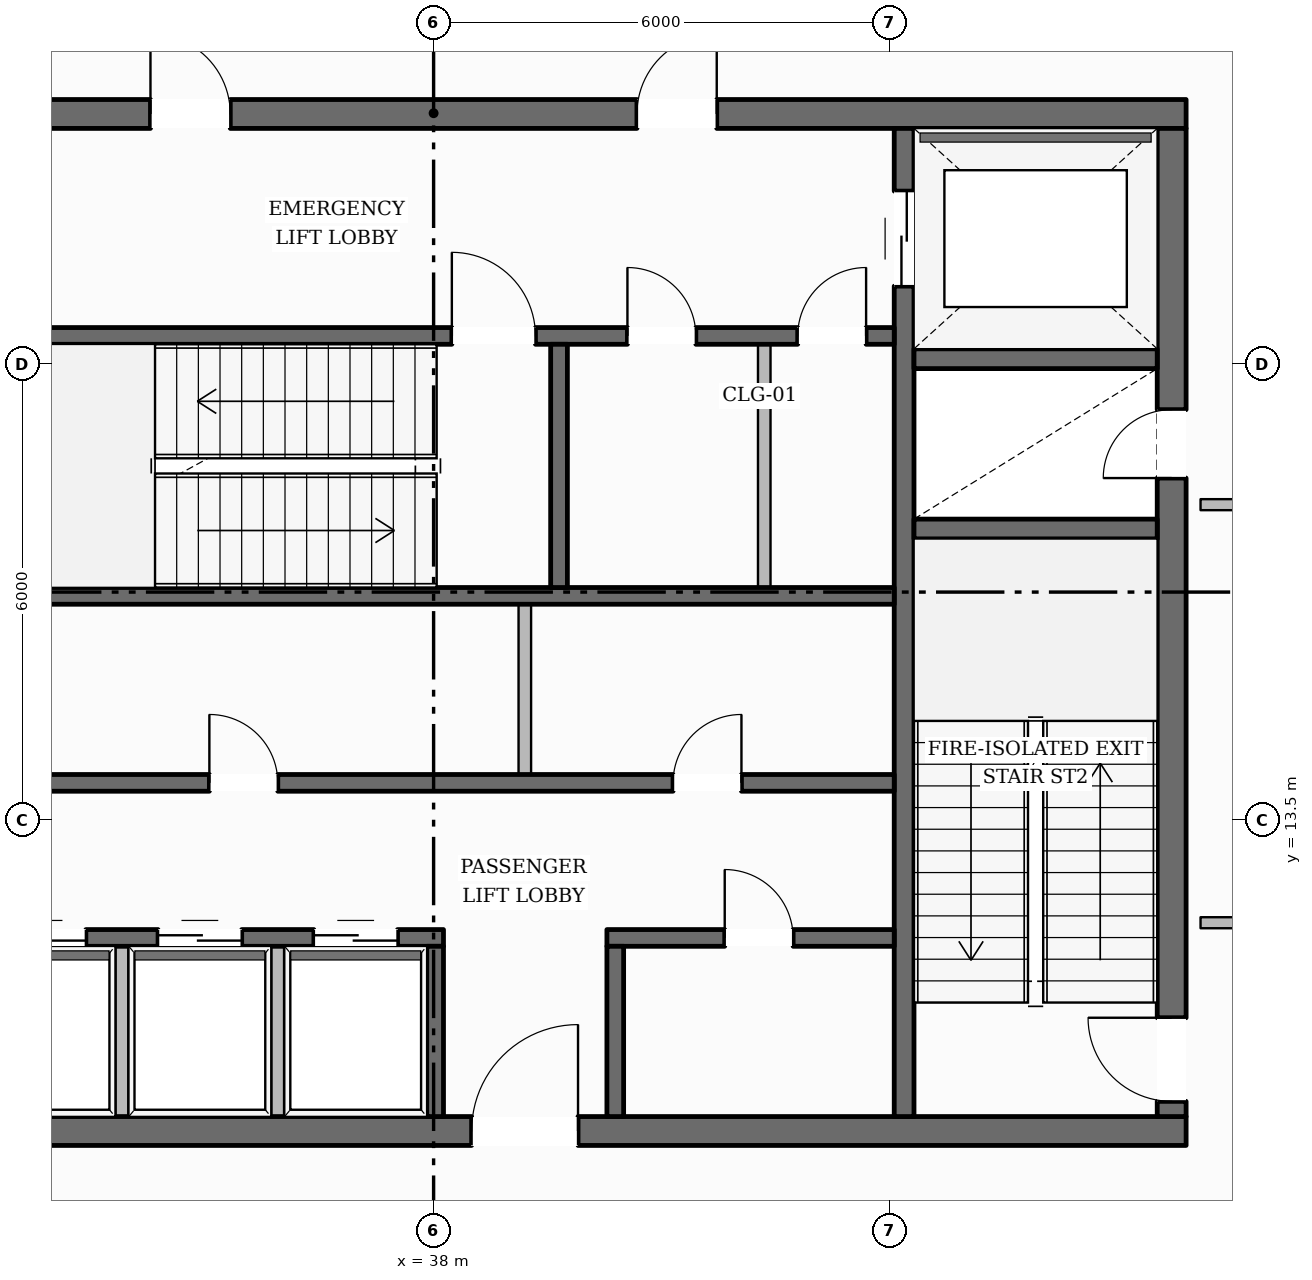
"""IFC4 building model, lengths in metres.
Left out: names, types, materials, properties, quantities, classifications, styles, units other than length and angle.
Written with IfcOpenShell. Run it as: python <this file> out.ifc"""

import sys

from ifc_helpers import new_model, si_unit, direction, frame, frame_2d, origin, place, context, subcontext, project, spatial, rectangle, extrude, element, fill, save


model = new_model("IFC4")
c1 = context("Model", 3, precision=1e-05, world=origin(), true_north=direction((0.0, 1.0)))
c2 = subcontext(c1, "Body", "Model", "MODEL_VIEW")
j1 = project(units=[si_unit("LENGTHUNIT", "METRE"), si_unit("PLANEANGLEUNIT", "RADIAN")], contexts=[c1])
p1 = place(None, origin())
s1 = spatial("IfcSite", under=j1, at=p1, CompositionType="ELEMENT")
p2 = place(p1, origin())
s2 = spatial("IfcBuilding", under=s1, at=p2, CompositionType="ELEMENT")
p3 = place(p2, frame((0.0, 0.0, 304.95)))
s3 = spatial("IfcBuildingStorey", under=s2, at=p3, CompositionType="ELEMENT", Elevation=304.95)
p4 = place(p3, frame((28.1, 9.41, 0.0), z_axis=(0.0, 0.0, 1.0), x_axis=(1.0, 0.0, 0.0)))
e1 = element("IfcWall", 1, at=p4, inside=s3, PredefinedType="SOLIDWALL", context=c2, shape_type="SweptSolid", body=[
    extrude(rectangle(XDim=19.8, YDim=0.38, at=frame_2d((9.9, 0.0))), origin(), (0.0, 0.0, 1.0), 4.77),
])
p5 = place(p4, frame((10.4, 0.0, 0.0)))
e2 = element("IfcOpeningElement", 2, at=p5, cuts=e1, PredefinedType="OPENING", context=c2, shape_type="SweptSolid", body=[
    extrude(rectangle(XDim=1.4, YDim=2.2, at=frame_2d((0.7, 1.1))), frame((0.0, 0.2, 0.0), z_axis=(0.0, -1.0, 0.0), x_axis=(1.0, 0.0, 0.0)), (0.0, 0.0, 1.0), 0.4),
])
p6 = place(p3, frame((28.1, 22.79, 0.0), z_axis=(0.0, 0.0, 1.0), x_axis=(1.0, 0.0, 0.0)))
e3 = element("IfcWall", 3, at=p6, inside=s3, PredefinedType="SOLIDWALL", context=c2, shape_type="SweptSolid", body=[
    extrude(rectangle(XDim=19.8, YDim=0.38, at=frame_2d((9.9, 0.0))), origin(), (0.0, 0.0, 1.0), 4.77),
])
p7 = place(p6, frame((6.175, 0.0, 0.0)))
e4 = element("IfcOpeningElement", 4, at=p7, cuts=e3, PredefinedType="OPENING", context=c2, shape_type="SweptSolid", body=[
    extrude(rectangle(XDim=1.05, YDim=2.15, at=frame_2d((0.525, 1.075))), frame((0.0, 0.2, 0.0), z_axis=(0.0, -1.0, 0.0), x_axis=(1.0, 0.0, 0.0)), (0.0, 0.0, 1.0), 0.4),
])
p8 = place(p6, frame((12.575, 0.0, 0.0)))
e5 = element("IfcOpeningElement", 5, at=p8, cuts=e3, PredefinedType="OPENING", context=c2, shape_type="SweptSolid", body=[
    extrude(rectangle(XDim=1.05, YDim=2.15, at=frame_2d((0.525, 1.075))), frame((0.0, 0.2, 0.0), z_axis=(0.0, -1.0, 0.0), x_axis=(1.0, 0.0, 0.0)), (0.0, 0.0, 1.0), 0.4),
])
p9 = place(p3, frame((47.71, 9.6, 0.0), z_axis=(0.0, 0.0, 1.0), x_axis=(0.0, 1.0, 0.0)))
e6 = element("IfcWall", 6, at=p9, inside=s3, PredefinedType="SOLIDWALL", context=c2, shape_type="SweptSolid", body=[
    extrude(rectangle(XDim=13.0, YDim=0.38, at=frame_2d((6.5, 0.0))), origin(), (0.0, 0.0, 1.0), 4.77),
])
p10 = place(p9, frame((0.2, 0.0, 0.0)))
e7 = element("IfcOpeningElement", 7, at=p10, cuts=e6, PredefinedType="OPENING", context=c2, shape_type="SweptSolid", body=[
    extrude(rectangle(XDim=1.1, YDim=2.15, at=frame_2d((0.55, 1.075))), frame((0.0, 0.2, 0.0), z_axis=(0.0, -1.0, 0.0), x_axis=(1.0, 0.0, 0.0)), (0.0, 0.0, 1.0), 0.4),
])
p11 = place(p9, frame((8.4, 0.0, 0.0)))
e8 = element("IfcOpeningElement", 8, at=p11, cuts=e6, PredefinedType="OPENING", context=c2, shape_type="SweptSolid", body=[
    extrude(rectangle(XDim=0.9, YDim=2.1, at=frame_2d((0.45, 1.05))), frame((0.0, 0.2, 0.0), z_axis=(0.0, -1.0, 0.0), x_axis=(1.0, 0.0, 0.0)), (0.0, 0.0, 1.0), 0.4),
])
p12 = place(p3, frame((44.19, 9.6, 0.0), z_axis=(0.0, 0.0, 1.0), x_axis=(0.0, 1.0, 0.0)))
e9 = element("IfcWall", 9, at=p12, inside=s3, PredefinedType="SHEAR", context=c2, shape_type="SweptSolid", body=[
    extrude(rectangle(XDim=13.0, YDim=0.26, at=frame_2d((6.5, 0.0))), origin(), (0.0, 0.0, 1.0), 4.77),
])
p13 = place(p12, frame((10.925, 0.0, 0.0)))
e10 = element("IfcOpeningElement", 10, at=p13, cuts=e9, PredefinedType="OPENING", context=c2, shape_type="SweptSolid", body=[
    extrude(rectangle(XDim=1.25, YDim=2.25, at=frame_2d((0.625, 1.125))), frame((0.0, 0.14, 0.0), z_axis=(0.0, -1.0, 0.0), x_axis=(1.0, 0.0, 0.0)), (0.0, 0.0, 1.0), 0.28),
])
for number, where, z_axis, x_axis in (
    (11, (44.32, 17.33, 0.0), (0.0, 0.0, 1.0), (1.0, 0.0, 0.0)),
    (12, (44.32, 19.57, 0.0), (0.0, 0.0, 1.0), (1.0, 0.0, 0.0)),
):
    element("IfcWall", number, at=place(p3, frame(where, z_axis=z_axis, x_axis=x_axis)), inside=s3, PredefinedType="SHEAR", context=c2, shape_type="SweptSolid", body=[
        extrude(rectangle(XDim=3.2, YDim=0.26, at=frame_2d((1.6, 0.0))), origin(), (0.0, 0.0, 1.0), 4.77),
    ])
p14 = place(p3, frame((31.94, 19.87, 0.0), z_axis=(0.0, 0.0, 1.0), x_axis=(1.0, 0.0, 0.0)))
e13 = element("IfcWall", 13, at=p14, inside=s3, PredefinedType="SOLIDWALL", context=c2, shape_type="SweptSolid", body=[
    extrude(rectangle(XDim=12.12, YDim=0.22, at=frame_2d((6.06, 0.0))), origin(), (0.0, 0.0, 1.0), 4.77),
])
p15 = place(p14, frame((6.3, 0.0, 0.0)))
e14 = element("IfcOpeningElement", 14, at=p15, cuts=e13, PredefinedType="OPENING", context=c2, shape_type="SweptSolid", body=[
    extrude(rectangle(XDim=1.1, YDim=2.15, at=frame_2d((0.55, 1.075))), frame((0.0, 0.12, 0.0), z_axis=(0.0, -1.0, 0.0), x_axis=(1.0, 0.0, 0.0)), (0.0, 0.0, 1.0), 0.24),
])
p16 = place(p14, frame((8.61, 0.0, 0.0)))
e15 = element("IfcOpeningElement", 15, at=p16, cuts=e13, PredefinedType="OPENING", context=c2, shape_type="SweptSolid", body=[
    extrude(rectangle(XDim=0.9, YDim=2.1, at=frame_2d((0.45, 1.05))), frame((0.0, 0.12, 0.0), z_axis=(0.0, -1.0, 0.0), x_axis=(1.0, 0.0, 0.0)), (0.0, 0.0, 1.0), 0.24),
])
p17 = place(p14, frame((10.85, 0.0, 0.0)))
e16 = element("IfcOpeningElement", 16, at=p17, cuts=e13, PredefinedType="OPENING", context=c2, shape_type="SweptSolid", body=[
    extrude(rectangle(XDim=0.9, YDim=2.1, at=frame_2d((0.45, 1.05))), frame((0.0, 0.12, 0.0), z_axis=(0.0, -1.0, 0.0), x_axis=(1.0, 0.0, 0.0)), (0.0, 0.0, 1.0), 0.24),
])
p18 = place(p3, frame((31.94, 16.45, 0.0), z_axis=(0.0, 0.0, 1.0), x_axis=(1.0, 0.0, 0.0)))
e17 = element("IfcWall", 17, at=p18, inside=s3, PredefinedType="SOLIDWALL", context=c2, shape_type="SweptSolid", body=[
    extrude(rectangle(XDim=12.12, YDim=0.22, at=frame_2d((6.06, 0.0))), origin(), (0.0, 0.0, 1.0), 4.77),
])
p19 = place(p3, frame((39.65, 16.56, 0.0), z_axis=(0.0, 0.0, 1.0), x_axis=(0.0, 1.0, 0.0)))
e18 = element("IfcWall", 18, at=p19, inside=s3, PredefinedType="SOLIDWALL", context=c2, shape_type="SweptSolid", body=[
    extrude(rectangle(XDim=3.2, YDim=0.22, at=frame_2d((1.6, 0.0))), origin(), (0.0, 0.0, 1.0), 4.77),
])
p20 = place(p3, frame((31.94, 13.99, 0.0), z_axis=(0.0, 0.0, 1.0), x_axis=(1.0, 0.0, 0.0)))
e19 = element("IfcWall", 19, at=p20, inside=s3, PredefinedType="SOLIDWALL", context=c2, shape_type="SweptSolid", body=[
    extrude(rectangle(XDim=12.12, YDim=0.22, at=frame_2d((6.06, 0.0))), origin(), (0.0, 0.0, 1.0), 4.77),
])
p21 = place(p20, frame((3.11, 0.0, 0.0)))
e20 = element("IfcOpeningElement", 20, at=p21, cuts=e19, PredefinedType="OPENING", context=c2, shape_type="SweptSolid", body=[
    extrude(rectangle(XDim=0.9, YDim=2.1, at=frame_2d((0.45, 1.05))), frame((0.0, 0.12, 0.0), z_axis=(0.0, -1.0, 0.0), x_axis=(1.0, 0.0, 0.0)), (0.0, 0.0, 1.0), 0.24),
])
p22 = place(p20, frame((9.21, 0.0, 0.0)))
e21 = element("IfcOpeningElement", 21, at=p22, cuts=e19, PredefinedType="OPENING", context=c2, shape_type="SweptSolid", body=[
    extrude(rectangle(XDim=0.9, YDim=2.1, at=frame_2d((0.45, 1.05))), frame((0.0, 0.12, 0.0), z_axis=(0.0, -1.0, 0.0), x_axis=(1.0, 0.0, 0.0)), (0.0, 0.0, 1.0), 0.24),
])
p23 = place(p3, frame((31.94, 11.95, 0.0), z_axis=(0.0, 0.0, 1.0), x_axis=(1.0, 0.0, 0.0)))
e22 = element("IfcWall", 22, at=p23, inside=s3, PredefinedType="SOLIDWALL", context=c2, shape_type="SweptSolid", body=[
    extrude(rectangle(XDim=6.19, YDim=0.22, at=frame_2d((3.095, 0.0))), origin(), (0.0, 0.0, 1.0), 4.77),
])
p24 = place(p23, frame((0.385, 0.0, 0.0)))
e23 = element("IfcOpeningElement", 23, at=p24, cuts=e22, PredefinedType="OPENING", context=c2, shape_type="SweptSolid", body=[
    extrude(rectangle(XDim=1.1, YDim=2.2, at=frame_2d((0.55, 1.1))), frame((0.0, 0.12, 0.0), z_axis=(0.0, -1.0, 0.0), x_axis=(1.0, 0.0, 0.0)), (0.0, 0.0, 1.0), 0.24),
])
p25 = place(p23, frame((2.435, 0.0, 0.0)))
e24 = element("IfcOpeningElement", 24, at=p25, cuts=e22, PredefinedType="OPENING", context=c2, shape_type="SweptSolid", body=[
    extrude(rectangle(XDim=1.1, YDim=2.2, at=frame_2d((0.55, 1.1))), frame((0.0, 0.12, 0.0), z_axis=(0.0, -1.0, 0.0), x_axis=(1.0, 0.0, 0.0)), (0.0, 0.0, 1.0), 0.24),
])
p26 = place(p23, frame((4.485, 0.0, 0.0)))
e25 = element("IfcOpeningElement", 25, at=p26, cuts=e22, PredefinedType="OPENING", context=c2, shape_type="SweptSolid", body=[
    extrude(rectangle(XDim=1.1, YDim=2.2, at=frame_2d((0.55, 1.1))), frame((0.0, 0.12, 0.0), z_axis=(0.0, -1.0, 0.0), x_axis=(1.0, 0.0, 0.0)), (0.0, 0.0, 1.0), 0.24),
])
p27 = place(p3, frame((40.28, 11.95, 0.0), z_axis=(0.0, 0.0, 1.0), x_axis=(1.0, 0.0, 0.0)))
e26 = element("IfcWall", 26, at=p27, inside=s3, PredefinedType="SOLIDWALL", context=c2, shape_type="SweptSolid", body=[
    extrude(rectangle(XDim=3.78, YDim=0.22, at=frame_2d((1.89, 0.0))), origin(), (0.0, 0.0, 1.0), 4.77),
])
p28 = place(p27, frame((1.55, 0.0, 0.0)))
e27 = element("IfcOpeningElement", 27, at=p28, cuts=e26, PredefinedType="OPENING", context=c2, shape_type="SweptSolid", body=[
    extrude(rectangle(XDim=0.9, YDim=2.1, at=frame_2d((0.45, 1.05))), frame((0.0, 0.12, 0.0), z_axis=(0.0, -1.0, 0.0), x_axis=(1.0, 0.0, 0.0)), (0.0, 0.0, 1.0), 0.24),
])
for number, where, z_axis, x_axis in (
    (28, (38.02, 9.6, 0.0), (0.0, 0.0, 1.0), (0.0, 1.0, 0.0)),
    (29, (40.39, 9.6, 0.0), (0.0, 0.0, 1.0), (0.0, 1.0, 0.0)),
):
    element("IfcWall", number, at=place(p3, frame(where, z_axis=z_axis, x_axis=x_axis)), inside=s3, PredefinedType="SOLIDWALL", context=c2, shape_type="SweptSolid", body=[
        extrude(rectangle(XDim=2.24, YDim=0.22, at=frame_2d((1.12, 0.0))), origin(), (0.0, 0.0, 1.0), 4.77),
    ])
p29 = place(p3, frame((15.972, 10.23, 0.0), z_axis=(0.0, 0.0, 1.0), x_axis=(0.490734788737, 0.871308996352, 0.0)))
e30 = element("IfcWall", 30, at=p29, inside=s3, PredefinedType="STANDARD", context=c2, shape_type="SweptSolid", body=[
    extrude(rectangle(XDim=39.892, YDim=0.35, at=frame_2d((19.946, 0.0))), origin(), (0.0, 0.0, 1.0), 4.012),
])
p30 = place(p29, frame((35.116, 0.0, 0.65)))
e31 = element("IfcOpeningElement", 31, at=p30, cuts=e30, PredefinedType="OPENING", context=c2, shape_type="SweptSolid", body=[
    extrude(rectangle(XDim=2.1, YDim=2.3, at=frame_2d((1.05, 1.15))), frame((0.0, 0.185, 0.0), z_axis=(0.0, -1.0, 0.0), x_axis=(1.0, 0.0, 0.0)), (0.0, 0.0, 1.0), 0.37),
])
p31 = place(p29, frame((2.666, 0.0, 0.65)))
e32 = element("IfcOpeningElement", 32, at=p31, cuts=e30, PredefinedType="OPENING", context=c2, shape_type="SweptSolid", body=[
    extrude(rectangle(XDim=2.1, YDim=2.3, at=frame_2d((1.05, 1.15))), frame((0.0, 0.185, 0.0), z_axis=(0.0, -1.0, 0.0), x_axis=(1.0, 0.0, 0.0)), (0.0, 0.0, 1.0), 0.37),
])
p32 = place(p3, frame((40.452, 44.989, 0.0), z_axis=(0.0, 0.0, 1.0), x_axis=(0.490734788737, -0.871308996352, 0.0)))
e33 = element("IfcWall", 33, at=p32, inside=s3, PredefinedType="STANDARD", context=c2, shape_type="SweptSolid", body=[
    extrude(rectangle(XDim=39.892, YDim=0.35, at=frame_2d((19.946, 0.0))), origin(), (0.0, 0.0, 1.0), 4.012),
])
p33 = place(p32, frame((35.126, 0.0, 0.65)))
e34 = element("IfcOpeningElement", 34, at=p33, cuts=e33, PredefinedType="OPENING", context=c2, shape_type="SweptSolid", body=[
    extrude(rectangle(XDim=2.1, YDim=2.3, at=frame_2d((1.05, 1.15))), frame((0.0, 0.185, 0.0), z_axis=(0.0, -1.0, 0.0), x_axis=(1.0, 0.0, 0.0)), (0.0, 0.0, 1.0), 0.37),
])
p34 = place(p32, frame((2.676, 0.0, 0.65)))
e35 = element("IfcOpeningElement", 35, at=p34, cuts=e33, PredefinedType="OPENING", context=c2, shape_type="SweptSolid", body=[
    extrude(rectangle(XDim=2.1, YDim=2.3, at=frame_2d((1.05, 1.15))), frame((0.0, 0.185, 0.0), z_axis=(0.0, -1.0, 0.0), x_axis=(1.0, 0.0, 0.0)), (0.0, 0.0, 1.0), 0.37),
])
for number, where, z_axis, x_axis in (
    (36, (33.9, 9.49, 0.0), (0.0, 0.0, 1.0), (0.0, 1.0, 0.0)),
    (37, (35.95, 9.49, 0.0), (0.0, 0.0, 1.0), (0.0, 1.0, 0.0)),
):
    element("IfcWall", number, at=place(p3, frame(where, z_axis=z_axis, x_axis=x_axis)), inside=s3, PredefinedType="PARTITIONING", context=c2, shape_type="SweptSolid", body=[
        extrude(rectangle(XDim=2.35, YDim=0.165, at=frame_2d((1.175, 0.0))), origin(), (0.0, 0.0, 1.0), 4.77),
    ])
p35 = place(p3, frame((39.2, 14.1, 0.0), z_axis=(0.0, 0.0, 1.0), x_axis=(0.0, 1.0, 0.0)))
e38 = element("IfcWall", 38, at=p35, inside=s3, PredefinedType="PARTITIONING", context=c2, shape_type="SweptSolid", body=[
    extrude(rectangle(XDim=2.24, YDim=0.165, at=frame_2d((1.12, 0.0))), origin(), (0.0, 0.0, 1.0), 4.77),
])
p36 = place(p3, frame((42.35, 16.56, 0.0), z_axis=(0.0, 0.0, 1.0), x_axis=(0.0, 1.0, 0.0)))
e39 = element("IfcWall", 39, at=p36, inside=s3, PredefinedType="PARTITIONING", context=c2, shape_type="SweptSolid", body=[
    extrude(rectangle(XDim=3.2, YDim=0.165, at=frame_2d((1.6, 0.0))), origin(), (0.0, 0.0, 1.0), 4.77),
])
for number, where, z_axis, x_axis in (
    (40, (49.91, 17.65, 0.0), (0.0, 0.0, 1.0), (-1.0, 0.0, 0.0)),
    (41, (48.09, 12.15, 0.0), (0.0, 0.0, 1.0), (1.0, 0.0, 0.0)),
):
    element("IfcWall", number, at=place(p3, frame(where, z_axis=z_axis, x_axis=x_axis)), inside=s3, PredefinedType="PARTITIONING", context=c2, shape_type="SweptSolid", body=[
        extrude(rectangle(XDim=1.82, YDim=0.145, at=frame_2d((0.91, 0.0))), origin(), (0.0, 0.0, 1.0), 4.77),
    ])
p37 = place(p10, origin())
e42 = element("IfcDoor", 42, at=p37, inside=s3, OperationType="SINGLE_SWING_RIGHT", PredefinedType="DOOR", context=c2, shape_type="SweptSolid", body=[
    extrude(rectangle(XDim=1.1, YDim=2.15, at=frame_2d((0.55, 1.075))), frame((0.0, 0.025, 0.0), z_axis=(0.0, -1.0, 0.0), x_axis=(1.0, 0.0, 0.0)), (0.0, 0.0, 1.0), 0.05),
])
fill(e7, e42)
p38 = place(p15, origin())
e43 = element("IfcDoor", 43, at=p38, inside=s3, OperationType="SINGLE_SWING_LEFT", PredefinedType="DOOR", context=c2, shape_type="SweptSolid", body=[
    extrude(rectangle(XDim=1.1, YDim=2.15, at=frame_2d((0.55, 1.075))), frame((0.0, 0.025, 0.0), z_axis=(0.0, -1.0, 0.0), x_axis=(1.0, 0.0, 0.0)), (0.0, 0.0, 1.0), 0.05),
])
fill(e14, e43)
p39 = place(p11, origin())
e44 = element("IfcDoor", 44, at=p39, inside=s3, OperationType="SINGLE_SWING_LEFT", PredefinedType="DOOR", context=c2, shape_type="SweptSolid", body=[
    extrude(rectangle(XDim=0.9, YDim=2.1, at=frame_2d((0.45, 1.05))), frame((0.0, 0.025, 0.0), z_axis=(0.0, -1.0, 0.0), x_axis=(1.0, 0.0, 0.0)), (0.0, 0.0, 1.0), 0.05),
])
fill(e8, e44)
p40 = place(p7, origin())
e45 = element("IfcDoor", 45, at=p40, inside=s3, OperationType="SINGLE_SWING_LEFT", PredefinedType="DOOR", context=c2, shape_type="SweptSolid", body=[
    extrude(rectangle(XDim=1.05, YDim=2.15, at=frame_2d((0.525, 1.075))), frame((0.0, 0.025, 0.0), z_axis=(0.0, -1.0, 0.0), x_axis=(1.0, 0.0, 0.0)), (0.0, 0.0, 1.0), 0.05),
])
fill(e4, e45)
p41 = place(p8, origin())
e46 = element("IfcDoor", 46, at=p41, inside=s3, OperationType="SINGLE_SWING_RIGHT", PredefinedType="DOOR", context=c2, shape_type="SweptSolid", body=[
    extrude(rectangle(XDim=1.05, YDim=2.15, at=frame_2d((0.525, 1.075))), frame((0.0, 0.025, 0.0), z_axis=(0.0, -1.0, 0.0), x_axis=(1.0, 0.0, 0.0)), (0.0, 0.0, 1.0), 0.05),
])
fill(e5, e46)
p42 = place(p13, origin())
e47 = element("IfcDoor", 47, at=p42, inside=s3, OperationType="DOUBLE_DOOR_SLIDING", PredefinedType="DOOR", context=c2, shape_type="SweptSolid", body=[
    extrude(rectangle(XDim=1.25, YDim=2.25, at=frame_2d((0.625, 1.125))), frame((0.0, 0.025, 0.0), z_axis=(0.0, -1.0, 0.0), x_axis=(1.0, 0.0, 0.0)), (0.0, 0.0, 1.0), 0.05),
])
fill(e10, e47)
p43 = place(p5, origin())
e48 = element("IfcDoor", 48, at=p43, inside=s3, OperationType="SINGLE_SWING_RIGHT", PredefinedType="DOOR", context=c2, shape_type="SweptSolid", body=[
    extrude(rectangle(XDim=1.4, YDim=2.2, at=frame_2d((0.7, 1.1))), frame((0.0, 0.025, 0.0), z_axis=(0.0, -1.0, 0.0), x_axis=(1.0, 0.0, 0.0)), (0.0, 0.0, 1.0), 0.05),
])
fill(e2, e48)
p44 = place(p24, origin())
e49 = element("IfcDoor", 49, at=p44, inside=s3, OperationType="DOUBLE_DOOR_SLIDING", PredefinedType="DOOR", context=c2, shape_type="SweptSolid", body=[
    extrude(rectangle(XDim=1.1, YDim=2.2, at=frame_2d((0.55, 1.1))), frame((0.0, 0.025, 0.0), z_axis=(0.0, -1.0, 0.0), x_axis=(1.0, 0.0, 0.0)), (0.0, 0.0, 1.0), 0.05),
])
fill(e23, e49)
p45 = place(p25, origin())
e50 = element("IfcDoor", 50, at=p45, inside=s3, OperationType="DOUBLE_DOOR_SLIDING", PredefinedType="DOOR", context=c2, shape_type="SweptSolid", body=[
    extrude(rectangle(XDim=1.1, YDim=2.2, at=frame_2d((0.55, 1.1))), frame((0.0, 0.025, 0.0), z_axis=(0.0, -1.0, 0.0), x_axis=(1.0, 0.0, 0.0)), (0.0, 0.0, 1.0), 0.05),
])
fill(e24, e50)
p46 = place(p26, origin())
e51 = element("IfcDoor", 51, at=p46, inside=s3, OperationType="DOUBLE_DOOR_SLIDING", PredefinedType="DOOR", context=c2, shape_type="SweptSolid", body=[
    extrude(rectangle(XDim=1.1, YDim=2.2, at=frame_2d((0.55, 1.1))), frame((0.0, 0.025, 0.0), z_axis=(0.0, -1.0, 0.0), x_axis=(1.0, 0.0, 0.0)), (0.0, 0.0, 1.0), 0.05),
])
fill(e25, e51)
p47 = place(p21, origin())
e52 = element("IfcDoor", 52, at=p47, inside=s3, OperationType="SINGLE_SWING_LEFT", PredefinedType="DOOR", context=c2, shape_type="SweptSolid", body=[
    extrude(rectangle(XDim=0.9, YDim=2.1, at=frame_2d((0.45, 1.05))), frame((0.0, 0.025, 0.0), z_axis=(0.0, -1.0, 0.0), x_axis=(1.0, 0.0, 0.0)), (0.0, 0.0, 1.0), 0.05),
])
fill(e20, e52)
p48 = place(p22, origin())
e53 = element("IfcDoor", 53, at=p48, inside=s3, OperationType="SINGLE_SWING_RIGHT", PredefinedType="DOOR", context=c2, shape_type="SweptSolid", body=[
    extrude(rectangle(XDim=0.9, YDim=2.1, at=frame_2d((0.45, 1.05))), frame((0.0, 0.025, 0.0), z_axis=(0.0, -1.0, 0.0), x_axis=(1.0, 0.0, 0.0)), (0.0, 0.0, 1.0), 0.05),
])
fill(e21, e53)
p49 = place(p16, origin())
e54 = element("IfcDoor", 54, at=p49, inside=s3, OperationType="SINGLE_SWING_LEFT", PredefinedType="DOOR", context=c2, shape_type="SweptSolid", body=[
    extrude(rectangle(XDim=0.9, YDim=2.1, at=frame_2d((0.45, 1.05))), frame((0.0, 0.025, 0.0), z_axis=(0.0, -1.0, 0.0), x_axis=(1.0, 0.0, 0.0)), (0.0, 0.0, 1.0), 0.05),
])
fill(e15, e54)
p50 = place(p17, origin())
e55 = element("IfcDoor", 55, at=p50, inside=s3, OperationType="SINGLE_SWING_RIGHT", PredefinedType="DOOR", context=c2, shape_type="SweptSolid", body=[
    extrude(rectangle(XDim=0.9, YDim=2.1, at=frame_2d((0.45, 1.05))), frame((0.0, 0.025, 0.0), z_axis=(0.0, -1.0, 0.0), x_axis=(1.0, 0.0, 0.0)), (0.0, 0.0, 1.0), 0.05),
])
fill(e16, e55)
p51 = place(p28, origin())
e56 = element("IfcDoor", 56, at=p51, inside=s3, OperationType="SINGLE_SWING_LEFT", PredefinedType="DOOR", context=c2, shape_type="SweptSolid", body=[
    extrude(rectangle(XDim=0.9, YDim=2.1, at=frame_2d((0.45, 1.05))), frame((0.0, 0.025, 0.0), z_axis=(0.0, -1.0, 0.0), x_axis=(1.0, 0.0, 0.0)), (0.0, 0.0, 1.0), 0.05),
])
fill(e27, e56)
save(model, sys.argv[1])
